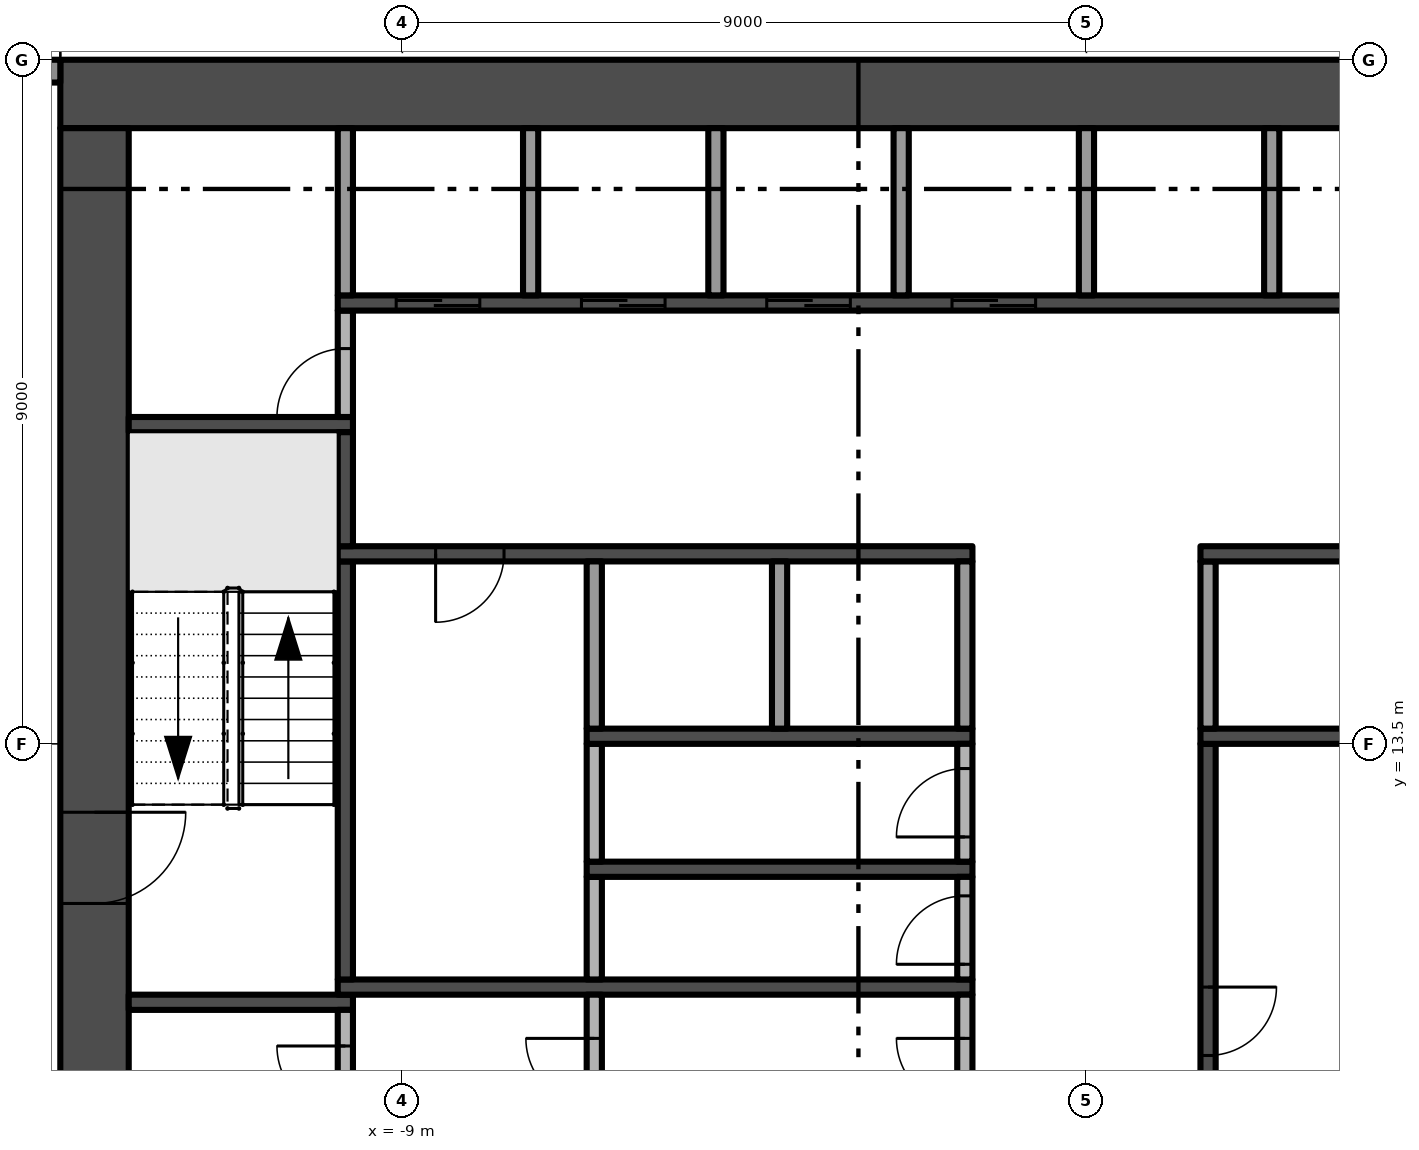
"""IFC4 building model, lengths in metres.
Left out: names, types, materials, properties, quantities, classifications, styles, units other than length and angle.
Written with IfcOpenShell. Run it as: python <this file> out.ifc"""

import sys

from ifc_helpers import new_model, si_unit, direction, frame, frame_2d, origin, place, context, subcontext, project, spatial, rectangle, extrude, element, fill, save


model = new_model("IFC4")
c1 = context("Model", 3, precision=1e-05, world=origin(), true_north=direction((0.0, 1.0)))
c2 = subcontext(c1, "Body", "Model", "MODEL_VIEW")
j1 = project(units=[si_unit("LENGTHUNIT", "METRE"), si_unit("PLANEANGLEUNIT", "RADIAN")], contexts=[c1])
p1 = place(None, origin())
s1 = spatial("IfcSite", under=j1, at=p1, CompositionType="ELEMENT")
p2 = place(p1, origin())
s2 = spatial("IfcBuilding", under=s1, at=p2, CompositionType="ELEMENT")
p3 = place(p2, frame((0.0, 0.0, 92.2)))
s3 = spatial("IfcBuildingStorey", under=s2, at=p3, CompositionType="ELEMENT", Elevation=92.2)
p4 = place(p3, frame((13.5, 22.05, -0.3), z_axis=(0.0, 0.0, 1.0), x_axis=(-1.0, 0.0, 0.0)))
e1 = element("IfcWall", 1, at=p4, inside=s3, PredefinedType="SHEAR", context=c2, shape_type="SweptSolid", body=[
    extrude(rectangle(XDim=27.0, YDim=0.9, at=frame_2d((13.5, 0.0))), origin(), (0.0, 0.0, 1.0), 3.8),
])
p5 = place(p3, frame((-13.05, 21.6, -0.3), z_axis=(0.0, 0.0, 1.0), x_axis=(0.0, -1.0, 0.0)))
e2 = element("IfcWall", 2, at=p5, inside=s3, PredefinedType="SHEAR", context=c2, shape_type="SweptSolid", body=[
    extrude(rectangle(XDim=16.2, YDim=0.9, at=frame_2d((8.1, 0.0))), origin(), (0.0, 0.0, 1.0), 3.8),
])
p6 = place(p5, frame((9.0, 0.0, 0.3)))
e3 = element("IfcOpeningElement", 3, at=p6, cuts=e2, PredefinedType="OPENING", context=c2, shape_type="SweptSolid", body=[
    extrude(rectangle(XDim=1.2, YDim=2.2, at=frame_2d((0.6, 1.1))), frame((0.0, 0.46, 0.0), z_axis=(0.0, -1.0, 0.0), x_axis=(1.0, 0.0, 0.0)), (0.0, 0.0, 1.0), 0.92),
])
p7 = place(p3, frame((-17.35, 22.35, 0.0), z_axis=(0.0, 0.0, 1.0), x_axis=(1.0, 0.0, 0.0)))
e4 = element("IfcWall", 4, at=p7, inside=s3, PredefinedType="SOLIDWALL", context=c2, shape_type="SweptSolid", body=[
    extrude(rectangle(XDim=3.85, YDim=0.3, at=frame_2d((1.925, 0.0))), origin(), (0.0, 0.0, 1.0), 3.5),
])
p8 = place(p7, frame((0.3, 0.0, 0.45)))
e5 = element("IfcOpeningElement", 5, at=p8, cuts=e4, PredefinedType="OPENING", context=c2, shape_type="SweptSolid", body=[
    extrude(rectangle(XDim=2.775, YDim=2.65, at=frame_2d((1.387, 1.325))), frame((0.0, 0.16, 0.0), z_axis=(0.0, -1.0, 0.0), x_axis=(1.0, 0.0, 0.0)), (0.0, 0.0, 1.0), 0.32),
])
for number, where, z_axis, x_axis in (
    (6, (-12.6, 10.1, 0.0), (0.0, 0.0, 1.0), (1.0, 0.0, 0.0)),
    (7, (-12.6, 17.7, 0.0), (0.0, 0.0, 1.0), (1.0, 0.0, 0.0)),
):
    element("IfcWall", number, at=place(p3, frame(where, z_axis=z_axis, x_axis=x_axis)), inside=s3, PredefinedType="SHEAR", context=c2, shape_type="SweptSolid", body=[
        extrude(rectangle(XDim=2.95, YDim=0.2, at=frame_2d((1.475, 0.0))), origin(), (0.0, 0.0, 1.0), 3.5),
    ])
p9 = place(p3, frame((-9.75, 8.15, 0.0), z_axis=(0.0, 0.0, 1.0), x_axis=(0.0, 1.0, 0.0)))
e8 = element("IfcWall", 8, at=p9, inside=s3, PredefinedType="PARTITIONING", context=c2, shape_type="SweptSolid", body=[
    extrude(rectangle(XDim=1.85, YDim=0.2, at=frame_2d((0.925, 0.0))), origin(), (0.0, 0.0, 1.0), 3.5),
])
p10 = place(p9, frame((0.475, 0.0, 0.0)))
e9 = element("IfcOpeningElement", 9, at=p10, cuts=e8, PredefinedType="OPENING", context=c2, shape_type="SweptSolid", body=[
    extrude(rectangle(XDim=0.9, YDim=2.1, at=frame_2d((0.45, 1.05))), frame((0.0, 0.11, 0.0), z_axis=(0.0, -1.0, 0.0), x_axis=(1.0, 0.0, 0.0)), (0.0, 0.0, 1.0), 0.22),
])
p11 = place(p3, frame((-9.85, 10.3, 0.0), z_axis=(0.0, 0.0, 1.0), x_axis=(1.0, 0.0, 0.0)))
e10 = element("IfcWall", 10, at=p11, inside=s3, PredefinedType="SHEAR", context=c2, shape_type="SweptSolid", body=[
    extrude(rectangle(XDim=8.35, YDim=0.2, at=frame_2d((4.175, 0.0))), origin(), (0.0, 0.0, 1.0), 3.5),
])
p12 = place(p3, frame((-9.75, 10.4, 0.0), z_axis=(0.0, 0.0, 1.0), x_axis=(0.0, 1.0, 0.0)))
e11 = element("IfcWall", 11, at=p12, inside=s3, PredefinedType="SHEAR", context=c2, shape_type="SweptSolid", body=[
    extrude(rectangle(XDim=5.5, YDim=0.2, at=frame_2d((2.75, 0.0))), origin(), (0.0, 0.0, 1.0), 3.5),
])
p13 = place(p3, frame((-1.5, 16.0, 0.0), z_axis=(0.0, 0.0, 1.0), x_axis=(-1.0, 0.0, 0.0)))
e12 = element("IfcWall", 12, at=p13, inside=s3, PredefinedType="SHEAR", context=c2, shape_type="SweptSolid", body=[
    extrude(rectangle(XDim=8.35, YDim=0.2, at=frame_2d((4.175, 0.0))), origin(), (0.0, 0.0, 1.0), 3.5),
])
p14 = place(p13, frame((6.162, 0.0, 0.0)))
e13 = element("IfcOpeningElement", 13, at=p14, cuts=e12, PredefinedType="OPENING", context=c2, shape_type="SweptSolid", body=[
    extrude(rectangle(XDim=0.9, YDim=2.1, at=frame_2d((0.45, 1.05))), frame((0.0, 0.11, 0.0), z_axis=(0.0, -1.0, 0.0), x_axis=(1.0, 0.0, 0.0)), (0.0, 0.0, 1.0), 0.22),
])
p15 = place(p3, frame((-9.75, 16.1, 0.0), z_axis=(0.0, 0.0, 1.0), x_axis=(0.0, 1.0, 0.0)))
e14 = element("IfcWall", 14, at=p15, inside=s3, PredefinedType="SHEAR", context=c2, shape_type="SweptSolid", body=[
    extrude(rectangle(XDim=1.5, YDim=0.2, at=frame_2d((0.75, 0.0))), origin(), (0.0, 0.0, 1.0), 3.5),
])
p16 = place(p3, frame((-9.75, 17.8, 0.0), z_axis=(0.0, 0.0, 1.0), x_axis=(0.0, 1.0, 0.0)))
e15 = element("IfcWall", 15, at=p16, inside=s3, PredefinedType="PARTITIONING", context=c2, shape_type="SweptSolid", body=[
    extrude(rectangle(XDim=1.4, YDim=0.2, at=frame_2d((0.7, 0.0))), origin(), (0.0, 0.0, 1.0), 3.5),
])
p17 = place(p16, origin())
e16 = element("IfcOpeningElement", 16, at=p17, cuts=e15, PredefinedType="OPENING", context=c2, shape_type="SweptSolid", body=[
    extrude(rectangle(XDim=0.9, YDim=2.1, at=frame_2d((0.45, 1.05))), frame((0.0, 0.11, 0.0), z_axis=(0.0, -1.0, 0.0), x_axis=(1.0, 0.0, 0.0)), (0.0, 0.0, 1.0), 0.22),
])
p18 = place(p3, frame((-9.85, 19.3, 0.0), z_axis=(0.0, 0.0, 1.0), x_axis=(1.0, 0.0, 0.0)))
e17 = element("IfcWall", 17, at=p18, inside=s3, PredefinedType="SHEAR", context=c2, shape_type="SweptSolid", body=[
    extrude(rectangle(XDim=19.7, YDim=0.2, at=frame_2d((9.85, 0.0))), origin(), (0.0, 0.0, 1.0), 3.5),
])
p19 = place(p18, frame((0.769, 0.0, 0.0)))
e18 = element("IfcOpeningElement", 18, at=p19, cuts=e17, PredefinedType="OPENING", context=c2, shape_type="SweptSolid", body=[
    extrude(rectangle(XDim=1.1, YDim=2.1, at=frame_2d((0.55, 1.05))), frame((0.0, 0.11, 0.0), z_axis=(0.0, -1.0, 0.0), x_axis=(1.0, 0.0, 0.0)), (0.0, 0.0, 1.0), 0.22),
])
p20 = place(p18, frame((3.206, 0.0, 0.0)))
e19 = element("IfcOpeningElement", 19, at=p20, cuts=e17, PredefinedType="OPENING", context=c2, shape_type="SweptSolid", body=[
    extrude(rectangle(XDim=1.1, YDim=2.1, at=frame_2d((0.55, 1.05))), frame((0.0, 0.11, 0.0), z_axis=(0.0, -1.0, 0.0), x_axis=(1.0, 0.0, 0.0)), (0.0, 0.0, 1.0), 0.22),
])
p21 = place(p18, frame((5.644, 0.0, 0.0)))
e20 = element("IfcOpeningElement", 20, at=p21, cuts=e17, PredefinedType="OPENING", context=c2, shape_type="SweptSolid", body=[
    extrude(rectangle(XDim=1.1, YDim=2.1, at=frame_2d((0.55, 1.05))), frame((0.0, 0.11, 0.0), z_axis=(0.0, -1.0, 0.0), x_axis=(1.0, 0.0, 0.0)), (0.0, 0.0, 1.0), 0.22),
])
p22 = place(p18, frame((8.081, 0.0, 0.0)))
e21 = element("IfcOpeningElement", 21, at=p22, cuts=e17, PredefinedType="OPENING", context=c2, shape_type="SweptSolid", body=[
    extrude(rectangle(XDim=1.1, YDim=2.1, at=frame_2d((0.55, 1.05))), frame((0.0, 0.11, 0.0), z_axis=(0.0, -1.0, 0.0), x_axis=(1.0, 0.0, 0.0)), (0.0, 0.0, 1.0), 0.22),
])
for number, where, z_axis, x_axis in (
    (22, (-9.75, 19.4, 0.0), (0.0, 0.0, 1.0), (0.0, 1.0, 0.0)),
    (23, (-7.312, 19.4, 0.0), (0.0, 0.0, 1.0), (0.0, 1.0, 0.0)),
):
    element("IfcWall", number, at=place(p3, frame(where, z_axis=z_axis, x_axis=x_axis)), inside=s3, PredefinedType="PARTITIONING", context=c2, shape_type="SweptSolid", body=[
        extrude(rectangle(XDim=2.2, YDim=0.2, at=frame_2d((1.1, 0.0))), origin(), (0.0, 0.0, 1.0), 3.5),
    ])
p23 = place(p3, frame((-6.475, 8.15, 0.0), z_axis=(0.0, 0.0, 1.0), x_axis=(0.0, 1.0, 0.0)))
e24 = element("IfcWall", 24, at=p23, inside=s3, PredefinedType="PARTITIONING", context=c2, shape_type="SweptSolid", body=[
    extrude(rectangle(XDim=2.05, YDim=0.2, at=frame_2d((1.025, 0.0))), origin(), (0.0, 0.0, 1.0), 3.5),
])
p24 = place(p23, frame((0.575, 0.0, 0.0)))
e25 = element("IfcOpeningElement", 25, at=p24, cuts=e24, PredefinedType="OPENING", context=c2, shape_type="SweptSolid", body=[
    extrude(rectangle(XDim=0.9, YDim=2.1, at=frame_2d((0.45, 1.05))), frame((0.0, 0.11, 0.0), z_axis=(0.0, -1.0, 0.0), x_axis=(1.0, 0.0, 0.0)), (0.0, 0.0, 1.0), 0.22),
])
p25 = place(p3, frame((-6.475, 10.4, 0.0), z_axis=(0.0, 0.0, 1.0), x_axis=(0.0, 1.0, 0.0)))
e26 = element("IfcWall", 26, at=p25, inside=s3, PredefinedType="PARTITIONING", context=c2, shape_type="SweptSolid", body=[
    extrude(rectangle(XDim=1.35, YDim=0.2, at=frame_2d((0.675, 0.0))), origin(), (0.0, 0.0, 1.0), 3.5),
])
p26 = place(p3, frame((-6.575, 11.85, 0.0), z_axis=(0.0, 0.0, 1.0), x_axis=(1.0, 0.0, 0.0)))
e27 = element("IfcWall", 27, at=p26, inside=s3, PredefinedType="SHEAR", context=c2, shape_type="SweptSolid", body=[
    extrude(rectangle(XDim=5.075, YDim=0.2, at=frame_2d((2.538, 0.0))), origin(), (0.0, 0.0, 1.0), 3.5),
])
p27 = place(p3, frame((-6.475, 11.95, 0.0), z_axis=(0.0, 0.0, 1.0), x_axis=(0.0, 1.0, 0.0)))
e28 = element("IfcWall", 28, at=p27, inside=s3, PredefinedType="PARTITIONING", context=c2, shape_type="SweptSolid", body=[
    extrude(rectangle(XDim=1.55, YDim=0.2, at=frame_2d((0.775, 0.0))), origin(), (0.0, 0.0, 1.0), 3.5),
])
p28 = place(p3, frame((-6.575, 13.6, 0.0), z_axis=(0.0, 0.0, 1.0), x_axis=(1.0, 0.0, 0.0)))
e29 = element("IfcWall", 29, at=p28, inside=s3, PredefinedType="SHEAR", context=c2, shape_type="SweptSolid", body=[
    extrude(rectangle(XDim=5.075, YDim=0.2, at=frame_2d((2.538, 0.0))), origin(), (0.0, 0.0, 1.0), 3.5),
])
for number, where, z_axis, x_axis in (
    (30, (-6.475, 13.7, 0.0), (0.0, 0.0, 1.0), (0.0, 1.0, 0.0)),
    (31, (-4.875, 19.4, 0.0), (0.0, 0.0, 1.0), (0.0, 1.0, 0.0)),
    (32, (-4.037, 13.7, 0.0), (0.0, 0.0, 1.0), (0.0, 1.0, 0.0)),
    (33, (-2.438, 19.4, 0.0), (0.0, 0.0, 1.0), (0.0, 1.0, 0.0)),
):
    element("IfcWall", number, at=place(p3, frame(where, z_axis=z_axis, x_axis=x_axis)), inside=s3, PredefinedType="PARTITIONING", context=c2, shape_type="SweptSolid", body=[
        extrude(rectangle(XDim=2.2, YDim=0.2, at=frame_2d((1.1, 0.0))), origin(), (0.0, 0.0, 1.0), 3.5),
    ])
p29 = place(p3, frame((-1.6, 8.15, 0.0), z_axis=(0.0, 0.0, 1.0), x_axis=(0.0, 1.0, 0.0)))
e34 = element("IfcWall", 34, at=p29, inside=s3, PredefinedType="PARTITIONING", context=c2, shape_type="SweptSolid", body=[
    extrude(rectangle(XDim=2.05, YDim=0.2, at=frame_2d((1.025, 0.0))), origin(), (0.0, 0.0, 1.0), 3.5),
])
p30 = place(p29, frame((0.575, 0.0, 0.0)))
e35 = element("IfcOpeningElement", 35, at=p30, cuts=e34, PredefinedType="OPENING", context=c2, shape_type="SweptSolid", body=[
    extrude(rectangle(XDim=0.9, YDim=2.1, at=frame_2d((0.45, 1.05))), frame((0.0, 0.11, 0.0), z_axis=(0.0, -1.0, 0.0), x_axis=(1.0, 0.0, 0.0)), (0.0, 0.0, 1.0), 0.22),
])
p31 = place(p3, frame((-1.6, 10.4, 0.0), z_axis=(0.0, 0.0, 1.0), x_axis=(0.0, 1.0, 0.0)))
e36 = element("IfcWall", 36, at=p31, inside=s3, PredefinedType="PARTITIONING", context=c2, shape_type="SweptSolid", body=[
    extrude(rectangle(XDim=1.35, YDim=0.2, at=frame_2d((0.675, 0.0))), origin(), (0.0, 0.0, 1.0), 3.5),
])
p32 = place(p31, frame((0.2, 0.0, 0.0)))
e37 = element("IfcOpeningElement", 37, at=p32, cuts=e36, PredefinedType="OPENING", context=c2, shape_type="SweptSolid", body=[
    extrude(rectangle(XDim=0.9, YDim=2.1, at=frame_2d((0.45, 1.05))), frame((0.0, 0.11, 0.0), z_axis=(0.0, -1.0, 0.0), x_axis=(1.0, 0.0, 0.0)), (0.0, 0.0, 1.0), 0.22),
])
p33 = place(p3, frame((-1.6, 11.95, 0.0), z_axis=(0.0, 0.0, 1.0), x_axis=(0.0, 1.0, 0.0)))
e38 = element("IfcWall", 38, at=p33, inside=s3, PredefinedType="PARTITIONING", context=c2, shape_type="SweptSolid", body=[
    extrude(rectangle(XDim=1.55, YDim=0.2, at=frame_2d((0.775, 0.0))), origin(), (0.0, 0.0, 1.0), 3.5),
])
p34 = place(p33, frame((0.325, 0.0, 0.0)))
e39 = element("IfcOpeningElement", 39, at=p34, cuts=e38, PredefinedType="OPENING", context=c2, shape_type="SweptSolid", body=[
    extrude(rectangle(XDim=0.9, YDim=2.1, at=frame_2d((0.45, 1.05))), frame((0.0, 0.11, 0.0), z_axis=(0.0, -1.0, 0.0), x_axis=(1.0, 0.0, 0.0)), (0.0, 0.0, 1.0), 0.22),
])
for number, where, z_axis, x_axis in (
    (40, (-1.6, 13.7, 0.0), (0.0, 0.0, 1.0), (0.0, 1.0, 0.0)),
    (41, (0.0, 19.4, 0.0), (0.0, 0.0, 1.0), (0.0, 1.0, 0.0)),
):
    element("IfcWall", number, at=place(p3, frame(where, z_axis=z_axis, x_axis=x_axis)), inside=s3, PredefinedType="PARTITIONING", context=c2, shape_type="SweptSolid", body=[
        extrude(rectangle(XDim=2.2, YDim=0.2, at=frame_2d((1.1, 0.0))), origin(), (0.0, 0.0, 1.0), 3.5),
    ])
p35 = place(p3, frame((1.6, 13.5, 0.0), z_axis=(0.0, 0.0, 1.0), x_axis=(0.0, -1.0, 0.0)))
e42 = element("IfcWall", 42, at=p35, inside=s3, PredefinedType="SHEAR", context=c2, shape_type="SweptSolid", body=[
    extrude(rectangle(XDim=8.1, YDim=0.2, at=frame_2d((4.05, 0.0))), origin(), (0.0, 0.0, 1.0), 3.5),
])
p36 = place(p35, frame((3.2, 0.0, 0.0)))
e43 = element("IfcOpeningElement", 43, at=p36, cuts=e42, PredefinedType="OPENING", context=c2, shape_type="SweptSolid", body=[
    extrude(rectangle(XDim=0.9, YDim=2.1, at=frame_2d((0.45, 1.05))), frame((0.0, 0.11, 0.0), z_axis=(0.0, -1.0, 0.0), x_axis=(1.0, 0.0, 0.0)), (0.0, 0.0, 1.0), 0.22),
])
p37 = place(p3, frame((1.5, 13.6, 0.0), z_axis=(0.0, 0.0, 1.0), x_axis=(1.0, 0.0, 0.0)))
e44 = element("IfcWall", 44, at=p37, inside=s3, PredefinedType="SHEAR", context=c2, shape_type="SweptSolid", body=[
    extrude(rectangle(XDim=5.075, YDim=0.2, at=frame_2d((2.538, 0.0))), origin(), (0.0, 0.0, 1.0), 3.5),
])
p38 = place(p3, frame((1.6, 13.7, 0.0), z_axis=(0.0, 0.0, 1.0), x_axis=(0.0, 1.0, 0.0)))
e45 = element("IfcWall", 45, at=p38, inside=s3, PredefinedType="PARTITIONING", context=c2, shape_type="SweptSolid", body=[
    extrude(rectangle(XDim=2.2, YDim=0.2, at=frame_2d((1.1, 0.0))), origin(), (0.0, 0.0, 1.0), 3.5),
])
p39 = place(p3, frame((9.85, 16.0, 0.0), z_axis=(0.0, 0.0, 1.0), x_axis=(-1.0, 0.0, 0.0)))
e46 = element("IfcWall", 46, at=p39, inside=s3, PredefinedType="SHEAR", context=c2, shape_type="SweptSolid", body=[
    extrude(rectangle(XDim=8.35, YDim=0.2, at=frame_2d((4.175, 0.0))), origin(), (0.0, 0.0, 1.0), 3.5),
])
p40 = place(p39, frame((1.288, 0.0, 0.0)))
e47 = element("IfcOpeningElement", 47, at=p40, cuts=e46, PredefinedType="OPENING", context=c2, shape_type="SweptSolid", body=[
    extrude(rectangle(XDim=0.9, YDim=2.1, at=frame_2d((0.45, 1.05))), frame((0.0, 0.11, 0.0), z_axis=(0.0, -1.0, 0.0), x_axis=(1.0, 0.0, 0.0)), (0.0, 0.0, 1.0), 0.22),
])
p41 = place(p3, frame((2.438, 19.4, 0.0), z_axis=(0.0, 0.0, 1.0), x_axis=(0.0, 1.0, 0.0)))
e48 = element("IfcWall", 48, at=p41, inside=s3, PredefinedType="PARTITIONING", context=c2, shape_type="SweptSolid", body=[
    extrude(rectangle(XDim=2.2, YDim=0.2, at=frame_2d((1.1, 0.0))), origin(), (0.0, 0.0, 1.0), 3.5),
])
p42 = place(p6, frame((1.2, 0.0, 0.0), z_axis=(0.0, 0.0, 1.0), x_axis=(-1.0, 0.0, 0.0)))
e49 = element("IfcDoor", 49, at=p42, inside=s3, OperationType="SINGLE_SWING_RIGHT", PredefinedType="DOOR", context=c2, shape_type="SweptSolid", body=[
    extrude(rectangle(XDim=1.2, YDim=2.2, at=frame_2d((0.6, 1.1))), frame((0.0, 0.025, 0.0), z_axis=(0.0, -1.0, 0.0), x_axis=(1.0, 0.0, 0.0)), (0.0, 0.0, 1.0), 0.05),
])
fill(e3, e49)
p43 = place(p19, origin())
e50 = element("IfcDoor", 50, at=p43, inside=s3, OperationType="SLIDING_TO_LEFT", PredefinedType="DOOR", context=c2, shape_type="SweptSolid", body=[
    extrude(rectangle(XDim=1.1, YDim=2.1, at=frame_2d((0.55, 1.05))), frame((0.0, 0.025, 0.0), z_axis=(0.0, -1.0, 0.0), x_axis=(1.0, 0.0, 0.0)), (0.0, 0.0, 1.0), 0.05),
])
fill(e18, e50)
p44 = place(p20, origin())
e51 = element("IfcDoor", 51, at=p44, inside=s3, OperationType="SLIDING_TO_LEFT", PredefinedType="DOOR", context=c2, shape_type="SweptSolid", body=[
    extrude(rectangle(XDim=1.1, YDim=2.1, at=frame_2d((0.55, 1.05))), frame((0.0, 0.025, 0.0), z_axis=(0.0, -1.0, 0.0), x_axis=(1.0, 0.0, 0.0)), (0.0, 0.0, 1.0), 0.05),
])
fill(e19, e51)
p45 = place(p21, origin())
e52 = element("IfcDoor", 52, at=p45, inside=s3, OperationType="SLIDING_TO_LEFT", PredefinedType="DOOR", context=c2, shape_type="SweptSolid", body=[
    extrude(rectangle(XDim=1.1, YDim=2.1, at=frame_2d((0.55, 1.05))), frame((0.0, 0.025, 0.0), z_axis=(0.0, -1.0, 0.0), x_axis=(1.0, 0.0, 0.0)), (0.0, 0.0, 1.0), 0.05),
])
fill(e20, e52)
p46 = place(p22, origin())
e53 = element("IfcDoor", 53, at=p46, inside=s3, OperationType="SLIDING_TO_LEFT", PredefinedType="DOOR", context=c2, shape_type="SweptSolid", body=[
    extrude(rectangle(XDim=1.1, YDim=2.1, at=frame_2d((0.55, 1.05))), frame((0.0, 0.025, 0.0), z_axis=(0.0, -1.0, 0.0), x_axis=(1.0, 0.0, 0.0)), (0.0, 0.0, 1.0), 0.05),
])
fill(e21, e53)
p47 = place(p14, origin())
e54 = element("IfcDoor", 54, at=p47, inside=s3, OperationType="SINGLE_SWING_RIGHT", PredefinedType="DOOR", context=c2, shape_type="SweptSolid", body=[
    extrude(rectangle(XDim=0.9, YDim=2.1, at=frame_2d((0.45, 1.05))), frame((0.0, 0.025, 0.0), z_axis=(0.0, -1.0, 0.0), x_axis=(1.0, 0.0, 0.0)), (0.0, 0.0, 1.0), 0.05),
])
fill(e13, e54)
p48 = place(p30, origin())
e55 = element("IfcDoor", 55, at=p48, inside=s3, OperationType="SINGLE_SWING_RIGHT", PredefinedType="DOOR", context=c2, shape_type="SweptSolid", body=[
    extrude(rectangle(XDim=0.9, YDim=2.1, at=frame_2d((0.45, 1.05))), frame((0.0, 0.025, 0.0), z_axis=(0.0, -1.0, 0.0), x_axis=(1.0, 0.0, 0.0)), (0.0, 0.0, 1.0), 0.05),
])
fill(e35, e55)
p49 = place(p32, origin())
e56 = element("IfcDoor", 56, at=p49, inside=s3, OperationType="SINGLE_SWING_LEFT", PredefinedType="DOOR", context=c2, shape_type="SweptSolid", body=[
    extrude(rectangle(XDim=0.9, YDim=2.1, at=frame_2d((0.45, 1.05))), frame((0.0, 0.025, 0.0), z_axis=(0.0, -1.0, 0.0), x_axis=(1.0, 0.0, 0.0)), (0.0, 0.0, 1.0), 0.05),
])
fill(e37, e56)
p50 = place(p34, origin())
e57 = element("IfcDoor", 57, at=p50, inside=s3, OperationType="SINGLE_SWING_LEFT", PredefinedType="DOOR", context=c2, shape_type="SweptSolid", body=[
    extrude(rectangle(XDim=0.9, YDim=2.1, at=frame_2d((0.45, 1.05))), frame((0.0, 0.025, 0.0), z_axis=(0.0, -1.0, 0.0), x_axis=(1.0, 0.0, 0.0)), (0.0, 0.0, 1.0), 0.05),
])
fill(e39, e57)
p51 = place(p36, origin())
e58 = element("IfcDoor", 58, at=p51, inside=s3, OperationType="SINGLE_SWING_LEFT", PredefinedType="DOOR", context=c2, shape_type="SweptSolid", body=[
    extrude(rectangle(XDim=0.9, YDim=2.1, at=frame_2d((0.45, 1.05))), frame((0.0, 0.025, 0.0), z_axis=(0.0, -1.0, 0.0), x_axis=(1.0, 0.0, 0.0)), (0.0, 0.0, 1.0), 0.05),
])
fill(e43, e58)
p52 = place(p17, origin())
e59 = element("IfcDoor", 59, at=p52, inside=s3, OperationType="SINGLE_SWING_LEFT", PredefinedType="DOOR", context=c2, shape_type="SweptSolid", body=[
    extrude(rectangle(XDim=0.9, YDim=2.1, at=frame_2d((0.45, 1.05))), frame((0.0, 0.025, 0.0), z_axis=(0.0, -1.0, 0.0), x_axis=(1.0, 0.0, 0.0)), (0.0, 0.0, 1.0), 0.05),
])
fill(e16, e59)
p53 = place(p24, origin())
e60 = element("IfcDoor", 60, at=p53, inside=s3, OperationType="SINGLE_SWING_RIGHT", PredefinedType="DOOR", context=c2, shape_type="SweptSolid", body=[
    extrude(rectangle(XDim=0.9, YDim=2.1, at=frame_2d((0.45, 1.05))), frame((0.0, 0.025, 0.0), z_axis=(0.0, -1.0, 0.0), x_axis=(1.0, 0.0, 0.0)), (0.0, 0.0, 1.0), 0.05),
])
fill(e25, e60)
p54 = place(p10, origin())
e61 = element("IfcDoor", 61, at=p54, inside=s3, OperationType="SINGLE_SWING_RIGHT", PredefinedType="DOOR", context=c2, shape_type="SweptSolid", body=[
    extrude(rectangle(XDim=0.9, YDim=2.1, at=frame_2d((0.45, 1.05))), frame((0.0, 0.025, 0.0), z_axis=(0.0, -1.0, 0.0), x_axis=(1.0, 0.0, 0.0)), (0.0, 0.0, 1.0), 0.05),
])
fill(e9, e61)
save(model, sys.argv[1])
